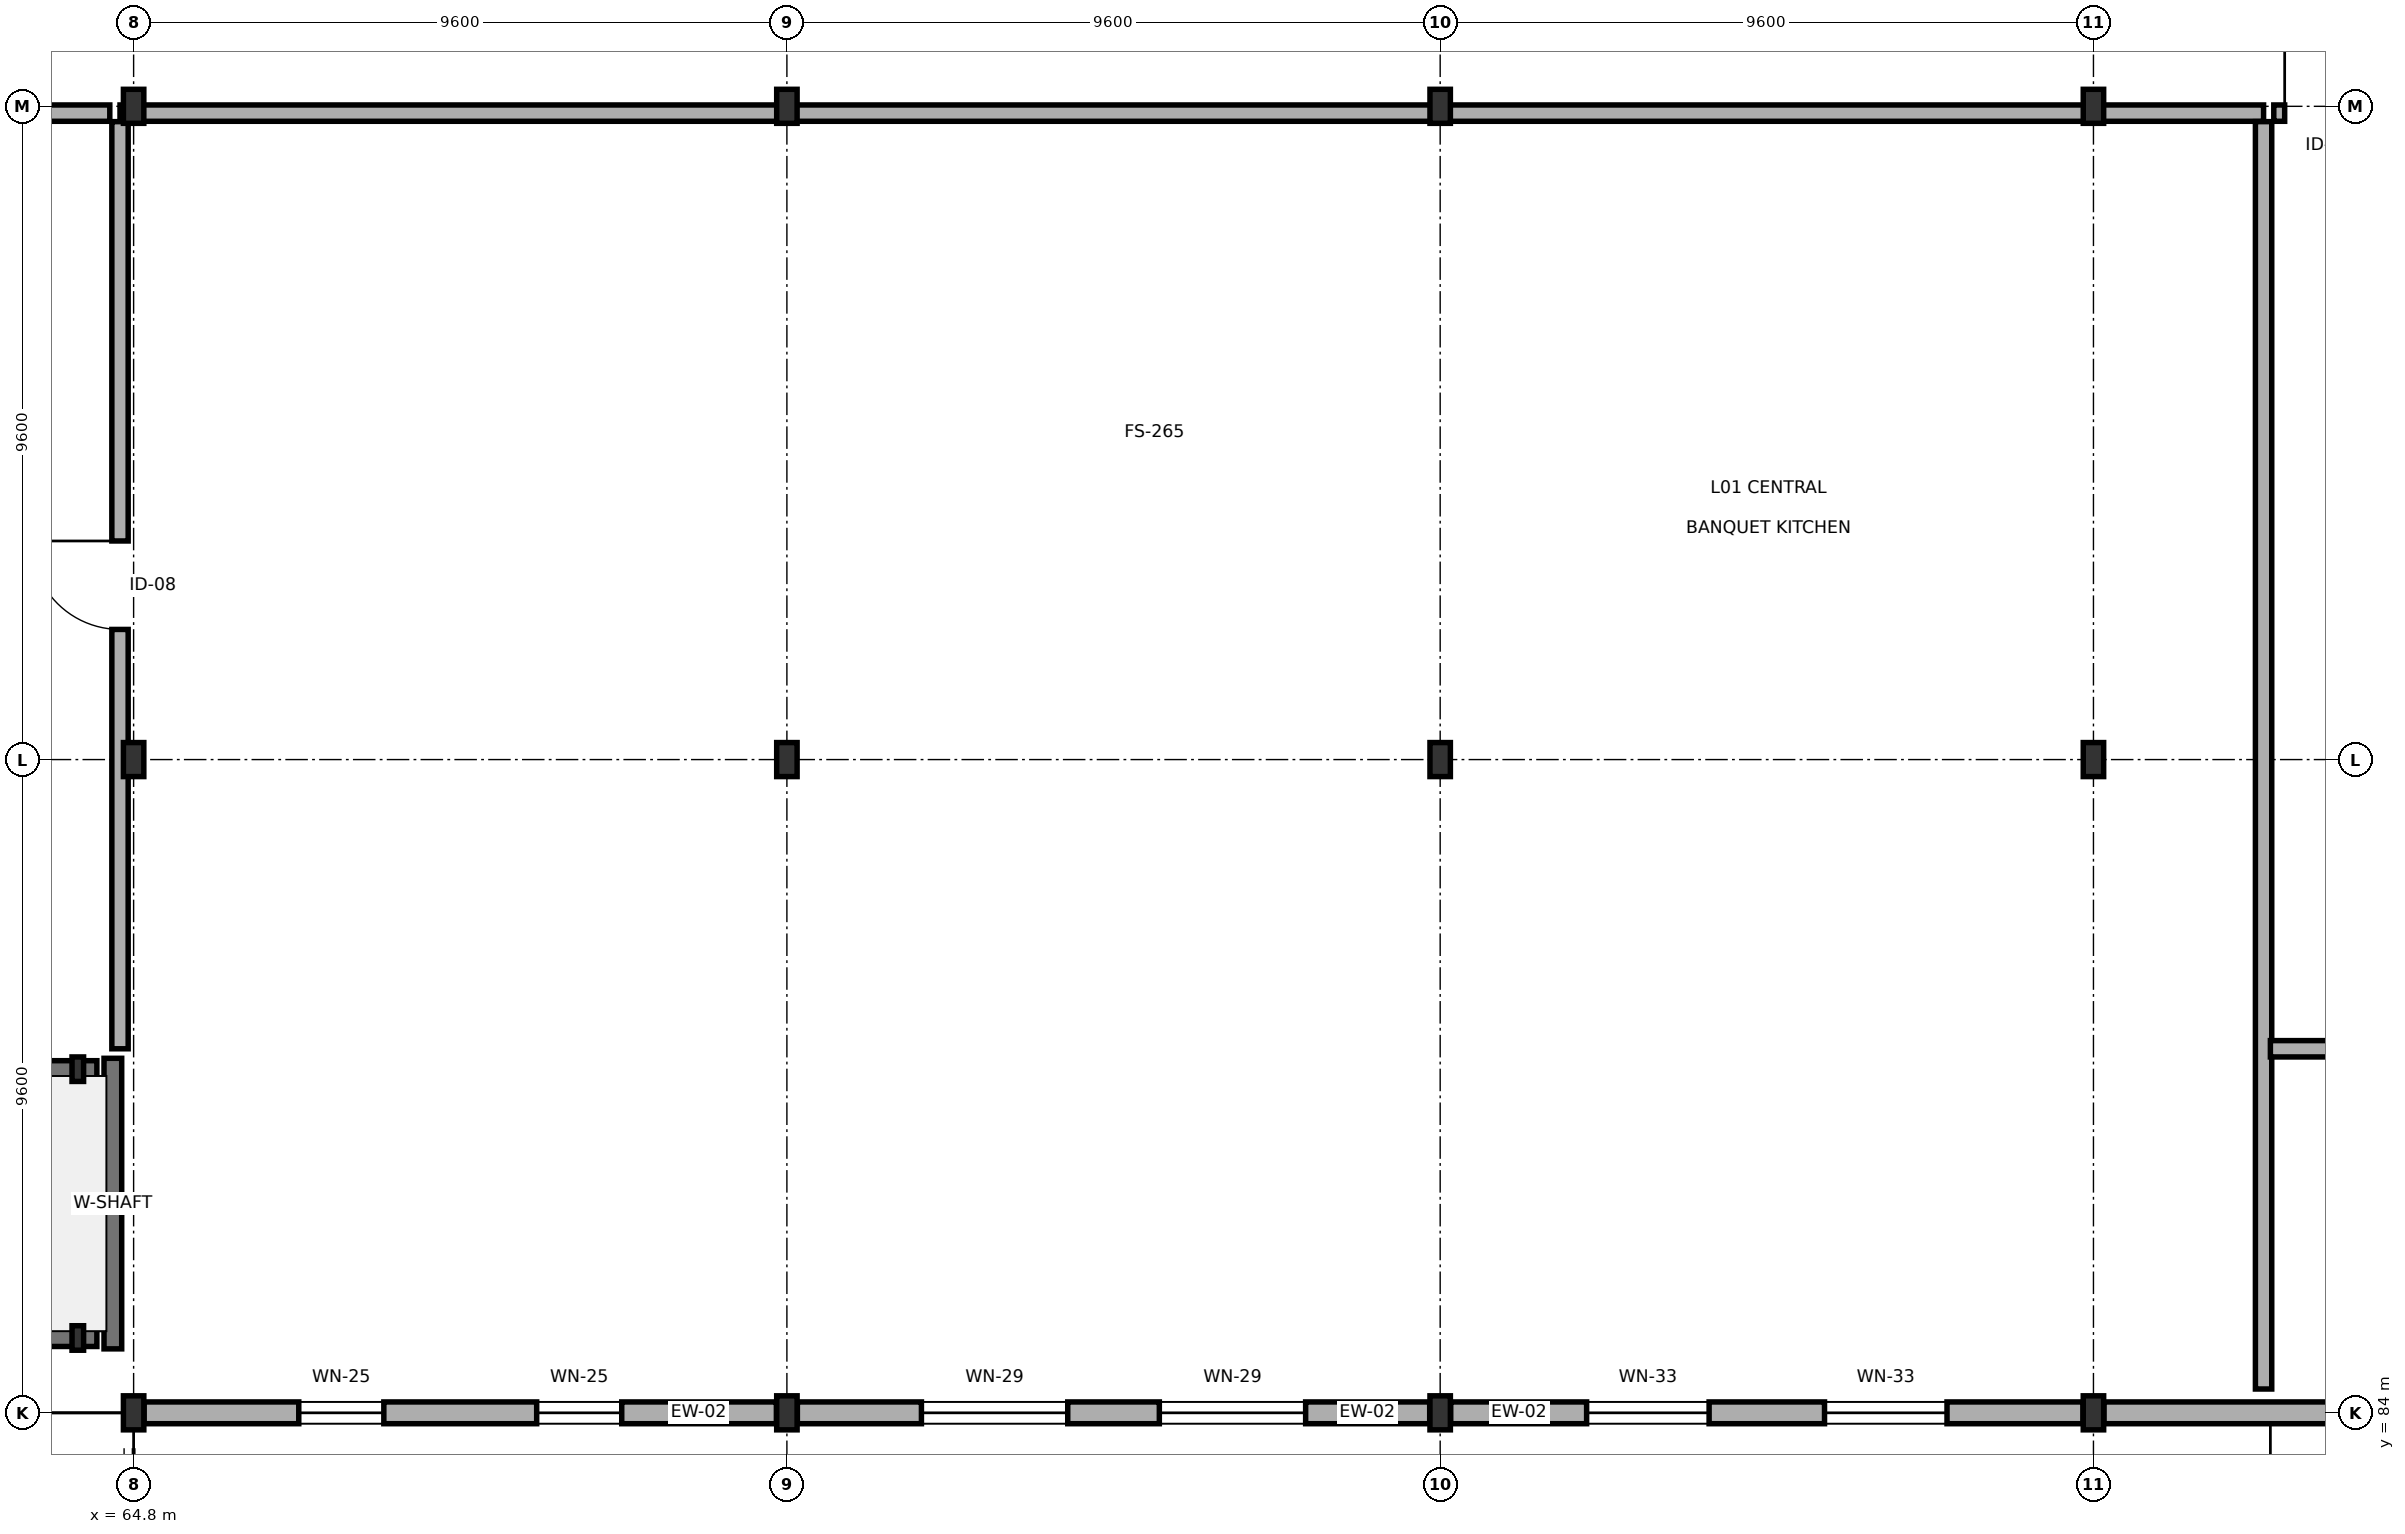
"""IFC4 building model, lengths in metres.
Left out: names, types, materials, properties, quantities, classifications, styles, units other than length and angle.
Written with IfcOpenShell. Run it as: python <this file> out.ifc"""

import sys

from ifc_helpers import new_model, si_unit, direction, frame, frame_2d, origin, origin_2d, place, context, subcontext, project, spatial, rectangle, i_section, extrude, element, fill, save


model = new_model("IFC4")
c1 = context("Model", 3, precision=1e-05, world=origin(), true_north=direction((0.0, 1.0)))
c2 = subcontext(c1, "Body", "Model", "MODEL_VIEW")
j1 = project(units=[si_unit("LENGTHUNIT", "METRE"), si_unit("PLANEANGLEUNIT", "RADIAN")], contexts=[c1])
p1 = place(None, origin())
s1 = spatial("IfcSite", under=j1, at=p1, CompositionType="ELEMENT")
p2 = place(p1, origin())
s2 = spatial("IfcBuilding", under=s1, at=p2, CompositionType="ELEMENT")
p3 = place(p2, origin())
s3 = spatial("IfcBuildingStorey", under=s2, at=p3, CompositionType="ELEMENT", Elevation=0.0)
for number, where, z_axis, x_axis in (
    (1, (64.8, 84.0, 0.0), (0.0, 0.0, 1.0), (1.0, 0.0, 0.0)),
    (2, (64.8, 93.6, 0.0), (0.0, 0.0, 1.0), (1.0, 0.0, 0.0)),
    (3, (64.8, 103.2, 0.0), (0.0, 0.0, 1.0), (1.0, 0.0, 0.0)),
    (4, (74.4, 84.0, 0.0), (0.0, 0.0, 1.0), (1.0, 0.0, 0.0)),
    (5, (74.4, 93.6, 0.0), (0.0, 0.0, 1.0), (1.0, 0.0, 0.0)),
    (6, (74.4, 103.2, 0.0), (0.0, 0.0, 1.0), (1.0, 0.0, 0.0)),
    (7, (84.0, 84.0, 0.0), (0.0, 0.0, 1.0), (1.0, 0.0, 0.0)),
    (8, (84.0, 93.6, 0.0), (0.0, 0.0, 1.0), (1.0, 0.0, 0.0)),
    (9, (84.0, 103.2, 0.0), (0.0, 0.0, 1.0), (1.0, 0.0, 0.0)),
    (10, (93.6, 84.0, 0.0), (0.0, 0.0, 1.0), (1.0, 0.0, 0.0)),
    (11, (93.6, 93.6, 0.0), (0.0, 0.0, 1.0), (1.0, 0.0, 0.0)),
    (12, (93.6, 103.2, 0.0), (0.0, 0.0, 1.0), (1.0, 0.0, 0.0)),
):
    element("IfcColumn", number, at=place(p3, frame(where, z_axis=z_axis, x_axis=x_axis)), inside=s3, PredefinedType="COLUMN", context=c2, shape_type="SweptSolid", body=[
        extrude(i_section(OverallWidth=0.3, OverallDepth=0.5, WebThickness=0.014, FlangeThickness=0.028, FilletRadius=0.027, at=origin_2d()), origin(), (0.0, 0.0, 1.0), 5.4),
    ])
for number, where, z_axis, x_axis in (
    (13, (63.98, 85.1, 0.0), (0.0, 0.0, 1.0), (1.0, 0.0, 0.0)),
    (14, (63.98, 89.05, 0.0), (0.0, 0.0, 1.0), (1.0, 0.0, 0.0)),
):
    element("IfcColumn", number, at=place(p3, frame(where, z_axis=z_axis, x_axis=x_axis)), inside=s3, PredefinedType="PILASTER", context=c2, shape_type="SweptSolid", body=[
        extrude(i_section(OverallWidth=0.17, OverallDepth=0.36, WebThickness=0.008, FlangeThickness=0.013, FilletRadius=0.018, at=origin_2d()), origin(), (0.0, 0.0, 1.0), 5.4),
    ])
p4 = place(p3, frame((64.954, 84.0, 0.0), z_axis=(0.0, 0.0, 1.0), x_axis=(1.0, 0.0, 0.0)))
e15 = element("IfcWall", 15, at=p4, inside=s3, PredefinedType="SOLIDWALL", context=c2, shape_type="SweptSolid", body=[
    extrude(rectangle(XDim=9.292, YDim=0.32, at=frame_2d((4.646, 0.0))), origin(), (0.0, 0.0, 1.0), 4.625),
])
p5 = place(p4, frame((2.273, 0.0, 0.75)))
e16 = element("IfcOpeningElement", 16, at=p5, cuts=e15, PredefinedType="OPENING", context=c2, shape_type="SweptSolid", body=[
    extrude(rectangle(XDim=1.25, YDim=1.95, at=frame_2d((0.625, 0.975))), frame((0.0, 0.17, 0.0), z_axis=(0.0, -1.0, 0.0), x_axis=(1.0, 0.0, 0.0)), (0.0, 0.0, 1.0), 0.34),
])
p6 = place(p4, frame((5.769, 0.0, 0.75)))
e17 = element("IfcOpeningElement", 17, at=p6, cuts=e15, PredefinedType="OPENING", context=c2, shape_type="SweptSolid", body=[
    extrude(rectangle(XDim=1.25, YDim=1.95, at=frame_2d((0.625, 0.975))), frame((0.0, 0.17, 0.0), z_axis=(0.0, -1.0, 0.0), x_axis=(1.0, 0.0, 0.0)), (0.0, 0.0, 1.0), 0.34),
])
p7 = place(p3, frame((74.554, 84.0, 0.0), z_axis=(0.0, 0.0, 1.0), x_axis=(1.0, 0.0, 0.0)))
e18 = element("IfcWall", 18, at=p7, inside=s3, PredefinedType="SOLIDWALL", context=c2, shape_type="SweptSolid", body=[
    extrude(rectangle(XDim=9.292, YDim=0.32, at=frame_2d((4.646, 0.0))), origin(), (0.0, 0.0, 1.0), 4.625),
])
p8 = place(p7, frame((1.823, 0.0, 0.75)))
e19 = element("IfcOpeningElement", 19, at=p8, cuts=e18, PredefinedType="OPENING", context=c2, shape_type="SweptSolid", body=[
    extrude(rectangle(XDim=2.15, YDim=1.95, at=frame_2d((1.075, 0.975))), frame((0.0, 0.17, 0.0), z_axis=(0.0, -1.0, 0.0), x_axis=(1.0, 0.0, 0.0)), (0.0, 0.0, 1.0), 0.34),
])
p9 = place(p7, frame((5.319, 0.0, 0.75)))
e20 = element("IfcOpeningElement", 20, at=p9, cuts=e18, PredefinedType="OPENING", context=c2, shape_type="SweptSolid", body=[
    extrude(rectangle(XDim=2.15, YDim=1.95, at=frame_2d((1.075, 0.975))), frame((0.0, 0.17, 0.0), z_axis=(0.0, -1.0, 0.0), x_axis=(1.0, 0.0, 0.0)), (0.0, 0.0, 1.0), 0.34),
])
p10 = place(p3, frame((84.154, 84.0, 0.0), z_axis=(0.0, 0.0, 1.0), x_axis=(1.0, 0.0, 0.0)))
e21 = element("IfcWall", 21, at=p10, inside=s3, PredefinedType="SOLIDWALL", context=c2, shape_type="SweptSolid", body=[
    extrude(rectangle(XDim=9.292, YDim=0.32, at=frame_2d((4.646, 0.0))), origin(), (0.0, 0.0, 1.0), 4.625),
])
p11 = place(p10, frame((1.998, 0.0, 0.75)))
e22 = element("IfcOpeningElement", 22, at=p11, cuts=e21, PredefinedType="OPENING", context=c2, shape_type="SweptSolid", body=[
    extrude(rectangle(XDim=1.8, YDim=2.1, at=frame_2d((0.9, 1.05))), frame((0.0, 0.17, 0.0), z_axis=(0.0, -1.0, 0.0), x_axis=(1.0, 0.0, 0.0)), (0.0, 0.0, 1.0), 0.34),
])
p12 = place(p10, frame((5.494, 0.0, 0.75)))
e23 = element("IfcOpeningElement", 23, at=p12, cuts=e21, PredefinedType="OPENING", context=c2, shape_type="SweptSolid", body=[
    extrude(rectangle(XDim=1.8, YDim=2.1, at=frame_2d((0.9, 1.05))), frame((0.0, 0.17, 0.0), z_axis=(0.0, -1.0, 0.0), x_axis=(1.0, 0.0, 0.0)), (0.0, 0.0, 1.0), 0.34),
])
p13 = place(p3, frame((93.754, 84.0, 0.0), z_axis=(0.0, 0.0, 1.0), x_axis=(1.0, 0.0, 0.0)))
e24 = element("IfcWall", 24, at=p13, inside=s3, PredefinedType="SOLIDWALL", context=c2, shape_type="SweptSolid", body=[
    extrude(rectangle(XDim=9.292, YDim=0.32, at=frame_2d((4.646, 0.0))), origin(), (0.0, 0.0, 1.0), 4.625),
])
p14 = place(p13, frame((3.446, 0.0, 0.0)))
e25 = element("IfcOpeningElement", 25, at=p14, cuts=e24, PredefinedType="OPENING", context=c2, shape_type="SweptSolid", body=[
    extrude(rectangle(XDim=2.0, YDim=2.3, at=frame_2d((1.0, 1.15))), frame((0.0, 0.17, 0.0), z_axis=(0.0, -1.0, 0.0), x_axis=(1.0, 0.0, 0.0)), (0.0, 0.0, 1.0), 0.34),
])
p15 = place(p3, frame((64.495, 84.94, 0.0), z_axis=(0.0, 0.0, 1.0), x_axis=(0.0, 1.0, 0.0)))
e26 = element("IfcWall", 26, at=p15, inside=s3, PredefinedType="SHEAR", context=c2, shape_type="SweptSolid", body=[
    extrude(rectangle(XDim=4.27, YDim=0.26, at=frame_2d((2.135, 0.0))), origin(), (0.0, 0.0, 1.0), 5.14),
])
p16 = place(p3, frame((55.74, 85.105, 0.0), z_axis=(0.0, 0.0, 1.0), x_axis=(1.0, 0.0, 0.0)))
e27 = element("IfcWall", 27, at=p16, inside=s3, PredefinedType="SHEAR", context=c2, shape_type="SweptSolid", body=[
    extrude(rectangle(XDim=8.52, YDim=0.26, at=frame_2d((4.26, 0.0))), origin(), (0.0, 0.0, 1.0), 5.14),
])
p17 = place(p16, frame((0.45, 0.0, 0.0)))
e28 = element("IfcOpeningElement", 28, at=p17, cuts=e27, PredefinedType="OPENING", context=c2, shape_type="SweptSolid", body=[
    extrude(rectangle(XDim=1.1, YDim=2.2, at=frame_2d((0.55, 1.1))), frame((0.0, 0.14, 0.0), z_axis=(0.0, -1.0, 0.0), x_axis=(1.0, 0.0, 0.0)), (0.0, 0.0, 1.0), 0.28),
])
p18 = place(p3, frame((55.74, 89.045, 0.0), z_axis=(0.0, 0.0, 1.0), x_axis=(1.0, 0.0, 0.0)))
e29 = element("IfcWall", 29, at=p18, inside=s3, PredefinedType="SHEAR", context=c2, shape_type="SweptSolid", body=[
    extrude(rectangle(XDim=8.52, YDim=0.26, at=frame_2d((4.26, 0.0))), origin(), (0.0, 0.0, 1.0), 5.14),
])
p19 = place(p3, frame((64.6, 103.1, 0.0), z_axis=(0.0, 0.0, 1.0), x_axis=(1.0, 0.0, 0.0)))
e30 = element("IfcWall", 30, at=p19, inside=s3, PredefinedType="SOLIDWALL", context=c2, shape_type="SweptSolid", body=[
    extrude(rectangle(XDim=31.5, YDim=0.24, at=frame_2d((15.75, 0.0))), origin(), (0.0, 0.0, 1.0), 4.625),
])
p20 = place(p3, frame((96.1, 84.35, 0.0), z_axis=(0.0, 0.0, 1.0), x_axis=(0.0, 1.0, 0.0)))
e31 = element("IfcWall", 31, at=p20, inside=s3, PredefinedType="SOLIDWALL", context=c2, shape_type="SweptSolid", body=[
    extrude(rectangle(XDim=18.625, YDim=0.24, at=frame_2d((9.312, 0.0))), origin(), (0.0, 0.0, 1.0), 4.685),
])
p21 = place(p3, frame((64.6, 89.35, 0.0), z_axis=(0.0, 0.0, 1.0), x_axis=(0.0, 1.0, 0.0)))
e32 = element("IfcWall", 32, at=p21, inside=s3, PredefinedType="SOLIDWALL", context=c2, shape_type="SweptSolid", body=[
    extrude(rectangle(XDim=13.625, YDim=0.24, at=frame_2d((6.812, 0.0))), origin(), (0.0, 0.0, 1.0), 4.625),
])
p22 = place(p21, frame((6.163, 0.0, 0.0)))
e33 = element("IfcOpeningElement", 33, at=p22, cuts=e32, PredefinedType="OPENING", context=c2, shape_type="SweptSolid", body=[
    extrude(rectangle(XDim=1.3, YDim=2.2, at=frame_2d((0.65, 1.1))), frame((0.0, 0.13, 0.0), z_axis=(0.0, -1.0, 0.0), x_axis=(1.0, 0.0, 0.0)), (0.0, 0.0, 1.0), 0.26),
])
p23 = place(p3, frame((62.75, 103.1, 0.0), z_axis=(0.0, 0.0, 1.0), x_axis=(1.0, 0.0, 0.0)))
e34 = element("IfcWall", 34, at=p23, inside=s3, PredefinedType="SOLIDWALL", context=c2, shape_type="SweptSolid", body=[
    extrude(rectangle(XDim=1.7, YDim=0.24, at=frame_2d((0.85, 0.0))), origin(), (0.0, 0.0, 1.0), 4.685),
])
p24 = place(p3, frame((96.25, 103.1, 0.0), z_axis=(0.0, 0.0, 1.0), x_axis=(1.0, 0.0, 0.0)))
e35 = element("IfcWall", 35, at=p24, inside=s3, PredefinedType="SOLIDWALL", context=c2, shape_type="SweptSolid", body=[
    extrude(rectangle(XDim=21.2, YDim=0.24, at=frame_2d((10.6, 0.0))), origin(), (0.0, 0.0, 1.0), 4.625),
])
p25 = place(p24, frame((0.16, 0.0, 0.0)))
e36 = element("IfcOpeningElement", 36, at=p25, cuts=e35, PredefinedType="OPENING", context=c2, shape_type="SweptSolid", body=[
    extrude(rectangle(XDim=1.3, YDim=2.2, at=frame_2d((0.65, 1.1))), frame((0.0, 0.13, 0.0), z_axis=(0.0, -1.0, 0.0), x_axis=(1.0, 0.0, 0.0)), (0.0, 0.0, 1.0), 0.26),
])
p26 = place(p3, frame((96.2, 89.35, 0.0), z_axis=(0.0, 0.0, 1.0), x_axis=(1.0, 0.0, 0.0)))
e37 = element("IfcWall", 37, at=p26, inside=s3, PredefinedType="SOLIDWALL", context=c2, shape_type="SweptSolid", body=[
    extrude(rectangle(XDim=11.9, YDim=0.24, at=frame_2d((5.95, 0.0))), origin(), (0.0, 0.0, 1.0), 4.625),
])
p27 = place(p26, frame((5.35, 0.0, 0.0)))
e38 = element("IfcOpeningElement", 38, at=p27, cuts=e37, PredefinedType="OPENING", context=c2, shape_type="SweptSolid", body=[
    extrude(rectangle(XDim=1.2, YDim=2.2, at=frame_2d((0.6, 1.1))), frame((0.0, 0.13, 0.0), z_axis=(0.0, -1.0, 0.0), x_axis=(1.0, 0.0, 0.0)), (0.0, 0.0, 1.0), 0.26),
])
p28 = place(p5, origin())
e39 = element("IfcWindow", 39, at=p28, inside=s3, PartitioningType="SINGLE_PANEL", PredefinedType="WINDOW", context=c2, shape_type="SweptSolid", body=[
    extrude(rectangle(XDim=1.25, YDim=1.95, at=frame_2d((0.625, 0.975))), frame((0.0, 0.03, 0.0), z_axis=(0.0, -1.0, 0.0), x_axis=(1.0, 0.0, 0.0)), (0.0, 0.0, 1.0), 0.06),
])
fill(e16, e39)
p29 = place(p6, origin())
e40 = element("IfcWindow", 40, at=p29, inside=s3, PartitioningType="SINGLE_PANEL", PredefinedType="WINDOW", context=c2, shape_type="SweptSolid", body=[
    extrude(rectangle(XDim=1.25, YDim=1.95, at=frame_2d((0.625, 0.975))), frame((0.0, 0.03, 0.0), z_axis=(0.0, -1.0, 0.0), x_axis=(1.0, 0.0, 0.0)), (0.0, 0.0, 1.0), 0.06),
])
fill(e17, e40)
p30 = place(p8, origin())
e41 = element("IfcWindow", 41, at=p30, inside=s3, PartitioningType="SINGLE_PANEL", PredefinedType="WINDOW", context=c2, shape_type="SweptSolid", body=[
    extrude(rectangle(XDim=2.15, YDim=1.95, at=frame_2d((1.075, 0.975))), frame((0.0, 0.03, 0.0), z_axis=(0.0, -1.0, 0.0), x_axis=(1.0, 0.0, 0.0)), (0.0, 0.0, 1.0), 0.06),
])
fill(e19, e41)
p31 = place(p9, origin())
e42 = element("IfcWindow", 42, at=p31, inside=s3, PartitioningType="SINGLE_PANEL", PredefinedType="WINDOW", context=c2, shape_type="SweptSolid", body=[
    extrude(rectangle(XDim=2.15, YDim=1.95, at=frame_2d((1.075, 0.975))), frame((0.0, 0.03, 0.0), z_axis=(0.0, -1.0, 0.0), x_axis=(1.0, 0.0, 0.0)), (0.0, 0.0, 1.0), 0.06),
])
fill(e20, e42)
p32 = place(p11, origin())
e43 = element("IfcWindow", 43, at=p32, inside=s3, PartitioningType="SINGLE_PANEL", PredefinedType="WINDOW", context=c2, shape_type="SweptSolid", body=[
    extrude(rectangle(XDim=1.8, YDim=2.1, at=frame_2d((0.9, 1.05))), frame((0.0, 0.03, 0.0), z_axis=(0.0, -1.0, 0.0), x_axis=(1.0, 0.0, 0.0)), (0.0, 0.0, 1.0), 0.06),
])
fill(e22, e43)
p33 = place(p12, origin())
e44 = element("IfcWindow", 44, at=p33, inside=s3, PartitioningType="SINGLE_PANEL", PredefinedType="WINDOW", context=c2, shape_type="SweptSolid", body=[
    extrude(rectangle(XDim=1.8, YDim=2.1, at=frame_2d((0.9, 1.05))), frame((0.0, 0.03, 0.0), z_axis=(0.0, -1.0, 0.0), x_axis=(1.0, 0.0, 0.0)), (0.0, 0.0, 1.0), 0.06),
])
fill(e23, e44)
p34 = place(p22, origin())
e45 = element("IfcDoor", 45, at=p34, inside=s3, OperationType="SINGLE_SWING_RIGHT", PredefinedType="DOOR", context=c2, shape_type="SweptSolid", body=[
    extrude(rectangle(XDim=1.3, YDim=2.2, at=frame_2d((0.65, 1.1))), frame((0.0, 0.025, 0.0), z_axis=(0.0, -1.0, 0.0), x_axis=(1.0, 0.0, 0.0)), (0.0, 0.0, 1.0), 0.05),
])
fill(e33, e45)
p35 = place(p25, origin())
e46 = element("IfcDoor", 46, at=p35, inside=s3, OperationType="SINGLE_SWING_LEFT", PredefinedType="DOOR", context=c2, shape_type="SweptSolid", body=[
    extrude(rectangle(XDim=1.3, YDim=2.2, at=frame_2d((0.65, 1.1))), frame((0.0, 0.025, 0.0), z_axis=(0.0, -1.0, 0.0), x_axis=(1.0, 0.0, 0.0)), (0.0, 0.0, 1.0), 0.05),
])
fill(e36, e46)
save(model, sys.argv[1])
